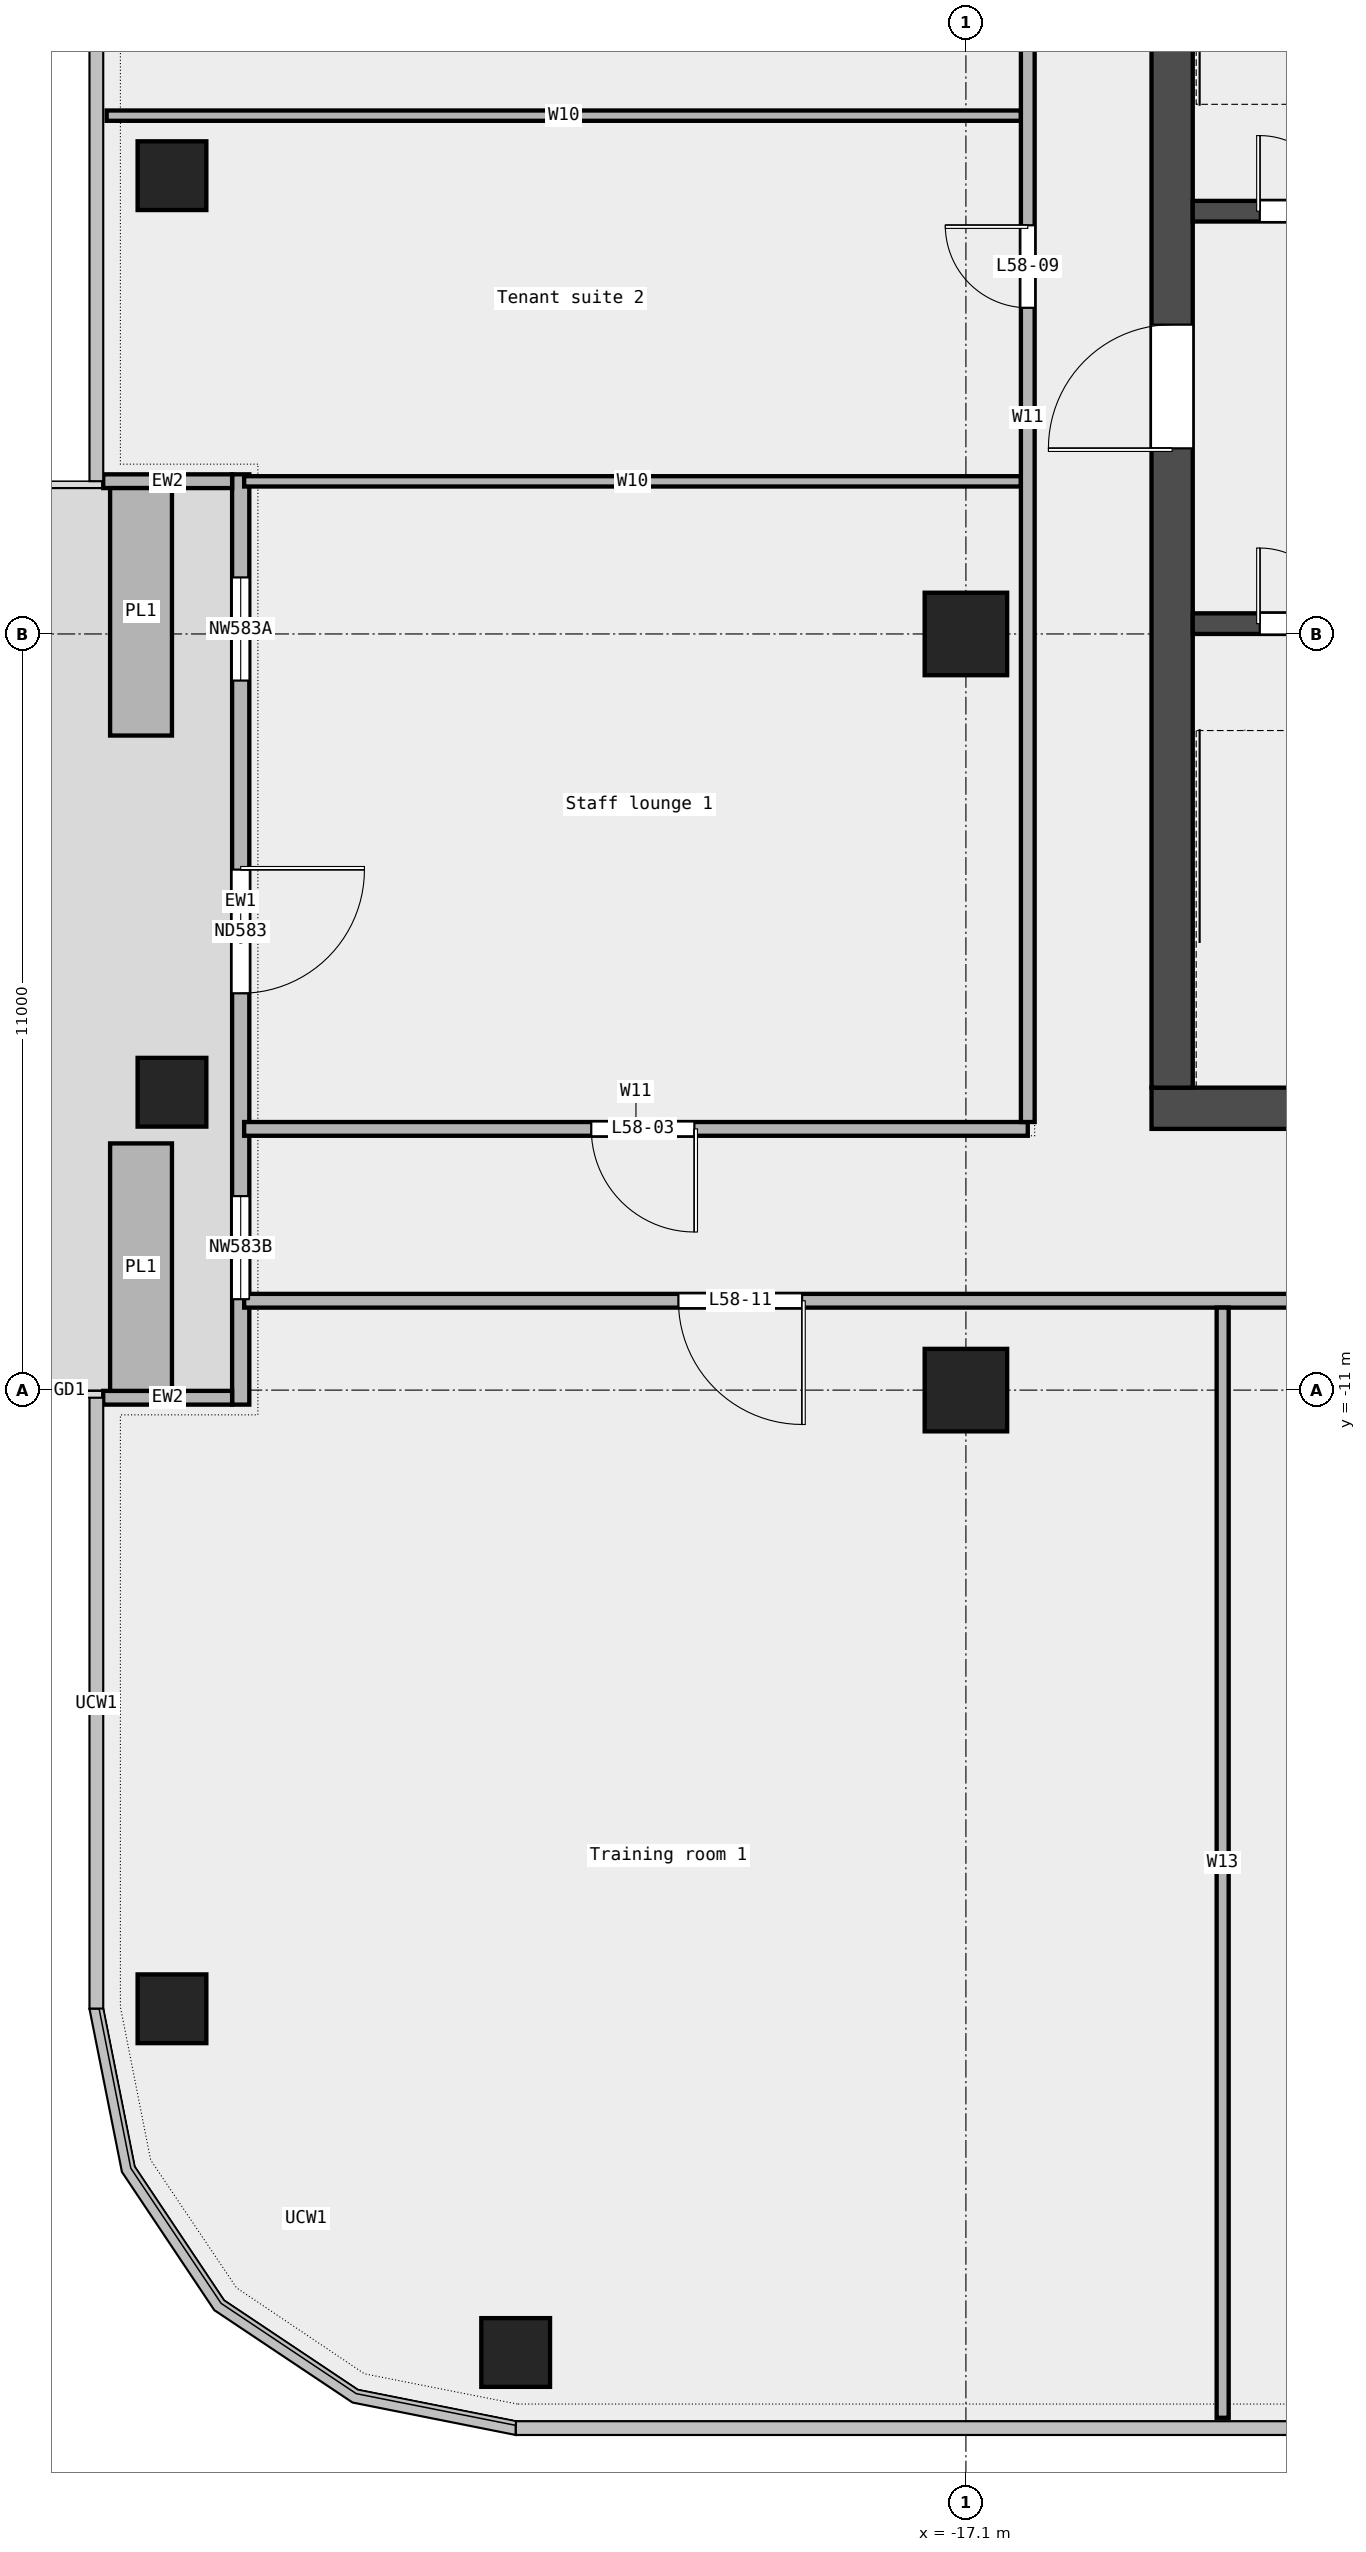
"""IFC4 building model, lengths in metres.
Left out: names, types, materials, properties, quantities, classifications, styles, units other than length and angle.
Written with IfcOpenShell. Run it as: python <this file> out.ifc"""

import sys

from ifc_helpers import new_model, si_unit, direction, frame, frame_2d, origin, origin_2d, place, context, subcontext, project, spatial, rectangle, extrude, element, fill, save


model = new_model("IFC4")
c1 = context("Model", 3, precision=1e-05, world=origin(), true_north=direction((0.0, 1.0)))
c2 = subcontext(c1, "Body", "Model", "MODEL_VIEW")
j1 = project(units=[si_unit("LENGTHUNIT", "METRE"), si_unit("PLANEANGLEUNIT", "RADIAN")], contexts=[c1])
p1 = place(None, origin())
s1 = spatial("IfcSite", under=j1, at=p1, CompositionType="ELEMENT")
p2 = place(p1, origin())
s2 = spatial("IfcBuilding", under=s1, at=p2, CompositionType="ELEMENT")
p3 = place(p2, frame((0.0, 0.0, 271.4)))
s3 = spatial("IfcBuildingStorey", under=s2, at=p3, CompositionType="ELEMENT", Elevation=271.4)
for number, where, z_axis, x_axis in (
    (1, (-23.65, -25.0, 0.0), (0.0, 0.0, 1.0), (1.0, 0.0, 0.0)),
    (2, (-28.65, 6.667, 0.0), (0.0, 0.0, 1.0), (1.0, 0.0, 0.0)),
    (3, (-28.65, -6.667, 0.0), (0.0, 0.0, 1.0), (1.0, 0.0, 0.0)),
    (4, (-28.65, -20.0, 0.0), (0.0, 0.0, 1.0), (1.0, 0.0, 0.0)),
):
    element("IfcColumn", number, at=place(p3, frame(where, z_axis=z_axis, x_axis=x_axis)), inside=s3, PredefinedType="COLUMN", context=c2, shape_type="SweptSolid", body=[
        extrude(rectangle(XDim=1.0, YDim=1.0, at=origin_2d()), origin(), (0.0, 0.0, 1.0), 3.6),
    ])
for number, where, z_axis, x_axis in (
    (5, (-17.1, -11.0, 0.0), (0.0, 0.0, 1.0), (1.0, 0.0, 0.0)),
    (6, (-17.1, 0.0, 0.0), (0.0, 0.0, 1.0), (1.0, 0.0, 0.0)),
):
    element("IfcColumn", number, at=place(p3, frame(where, z_axis=z_axis, x_axis=x_axis)), inside=s3, PredefinedType="COLUMN", context=c2, shape_type="SweptSolid", body=[
        extrude(rectangle(XDim=1.2, YDim=1.2, at=origin_2d()), origin(), (0.0, 0.0, 1.0), 3.6),
    ])
p4 = place(p3, frame((-27.65, 2.322, 0.0), z_axis=(0.0, 0.0, 1.0), x_axis=(0.0, -1.0, 0.0)))
e7 = element("IfcWall", 7, at=p4, inside=s3, PredefinedType="STANDARD", context=c2, shape_type="SweptSolid", body=[
    extrude(rectangle(XDim=13.533, YDim=0.25, at=frame_2d((6.767, 0.0))), origin(), (0.0, 0.0, 1.0), 3.6),
])
p5 = place(p4, frame((1.5, 0.0, 0.45)))
e8 = element("IfcOpeningElement", 8, at=p5, cuts=e7, PredefinedType="OPENING", context=c2, shape_type="SweptSolid", body=[
    extrude(rectangle(XDim=1.5, YDim=2.4, at=frame_2d((0.75, 1.2))), frame((0.0, 0.137, 0.0), z_axis=(0.0, -1.0, 0.0), x_axis=(1.0, 0.0, 0.0)), (0.0, 0.0, 1.0), 0.274),
])
p6 = place(p4, frame((5.75, 0.0, 0.0)))
e9 = element("IfcOpeningElement", 9, at=p6, cuts=e7, PredefinedType="OPENING", context=c2, shape_type="SweptSolid", body=[
    extrude(rectangle(XDim=1.8, YDim=2.4, at=frame_2d((0.9, 1.2))), frame((0.0, 0.137, 0.0), z_axis=(0.0, -1.0, 0.0), x_axis=(1.0, 0.0, 0.0)), (0.0, 0.0, 1.0), 0.274),
])
p7 = place(p4, frame((10.5, 0.0, 0.45)))
e10 = element("IfcOpeningElement", 10, at=p7, cuts=e7, PredefinedType="OPENING", context=c2, shape_type="SweptSolid", body=[
    extrude(rectangle(XDim=1.5, YDim=2.4, at=frame_2d((0.75, 1.2))), frame((0.0, 0.137, 0.0), z_axis=(0.0, -1.0, 0.0), x_axis=(1.0, 0.0, 0.0)), (0.0, 0.0, 1.0), 0.274),
])
for number, where, z_axis, x_axis in (
    (11, (-29.65, 2.222, 0.0), (0.0, 0.0, 1.0), (1.0, 0.0, 0.0)),
    (12, (-29.65, -11.111, 0.0), (0.0, 0.0, 1.0), (1.0, 0.0, 0.0)),
):
    element("IfcWall", number, at=place(p3, frame(where, z_axis=z_axis, x_axis=x_axis)), inside=s3, PredefinedType="STANDARD", context=c2, shape_type="SweptSolid", body=[
        extrude(rectangle(XDim=1.875, YDim=0.2, at=frame_2d((0.938, 0.0))), origin(), (0.0, 0.0, 1.0), 3.6),
    ])
for number, where, z_axis, x_axis in (
    (13, (-29.1, 2.122, 0.0), (0.0, 0.0, 1.0), (0.0, -1.0, 0.0)),
    (14, (-29.1, -7.411, 0.0), (0.0, 0.0, 1.0), (0.0, -1.0, 0.0)),
):
    element("IfcWall", number, at=place(p3, frame(where, z_axis=z_axis, x_axis=x_axis)), inside=s3, PredefinedType="STANDARD", context=c2, shape_type="SweptSolid", body=[
        extrude(rectangle(XDim=3.6, YDim=0.9, at=frame_2d((1.8, 0.0))), origin(), (0.0, 0.0, 1.0), 0.7),
    ])
p8 = place(p3, frame((-27.6, -9.7, 0.0), z_axis=(0.0, 0.0, 1.0), x_axis=(1.0, 0.0, 0.0)))
e15 = element("IfcWall", 15, at=p8, inside=s3, PredefinedType="PARTITIONING", context=c2, shape_type="SweptSolid", body=[
    extrude(rectangle(XDim=55.2, YDim=0.2, at=frame_2d((27.6, 0.0))), origin(), (0.0, 0.0, 1.0), 3.6),
])
p9 = place(p8, frame((47.083, 0.0, 0.0)))
e16 = element("IfcOpeningElement", 16, at=p9, cuts=e15, PredefinedType="OPENING", context=c2, shape_type="SweptSolid", body=[
    extrude(rectangle(XDim=1.8, YDim=2.1, at=frame_2d((0.9, 1.05))), frame((0.0, 0.112, 0.0), z_axis=(0.0, -1.0, 0.0), x_axis=(1.0, 0.0, 0.0)), (0.0, 0.0, 1.0), 0.224),
])
p10 = place(p8, frame((26.7, 0.0, 0.0)))
e17 = element("IfcOpeningElement", 17, at=p10, cuts=e15, PredefinedType="OPENING", context=c2, shape_type="SweptSolid", body=[
    extrude(rectangle(XDim=1.8, YDim=2.1, at=frame_2d((0.9, 1.05))), frame((0.0, 0.112, 0.0), z_axis=(0.0, -1.0, 0.0), x_axis=(1.0, 0.0, 0.0)), (0.0, 0.0, 1.0), 0.224),
])
p11 = place(p8, frame((6.317, 0.0, 0.0)))
e18 = element("IfcOpeningElement", 18, at=p11, cuts=e15, PredefinedType="OPENING", context=c2, shape_type="SweptSolid", body=[
    extrude(rectangle(XDim=1.8, YDim=2.1, at=frame_2d((0.9, 1.05))), frame((0.0, 0.112, 0.0), z_axis=(0.0, -1.0, 0.0), x_axis=(1.0, 0.0, 0.0)), (0.0, 0.0, 1.0), 0.224),
])
p12 = place(p3, frame((-27.6, -7.2, 0.0), z_axis=(0.0, 0.0, 1.0), x_axis=(1.0, 0.0, 0.0)))
e19 = element("IfcWall", 19, at=p12, inside=s3, PredefinedType="PARTITIONING", context=c2, shape_type="SweptSolid", body=[
    extrude(rectangle(XDim=11.4, YDim=0.2, at=frame_2d((5.7, 0.0))), origin(), (0.0, 0.0, 1.0), 3.6),
])
p13 = place(p12, frame((5.05, 0.0, 0.0)))
e20 = element("IfcOpeningElement", 20, at=p13, cuts=e19, PredefinedType="OPENING", context=c2, shape_type="SweptSolid", body=[
    extrude(rectangle(XDim=1.5, YDim=2.1, at=frame_2d((0.75, 1.05))), frame((0.0, 0.112, 0.0), z_axis=(0.0, -1.0, 0.0), x_axis=(1.0, 0.0, 0.0)), (0.0, 0.0, 1.0), 0.224),
])
p14 = place(p3, frame((-27.6, 2.22, 0.0), z_axis=(0.0, 0.0, 1.0), x_axis=(1.0, 0.0, 0.0)))
e21 = element("IfcWall", 21, at=p14, inside=s3, PredefinedType="PARTITIONING", context=c2, shape_type="SweptSolid", body=[
    extrude(rectangle(XDim=11.3, YDim=0.15, at=frame_2d((5.65, 0.0))), origin(), (0.0, 0.0, 1.0), 3.6),
])
p15 = place(p3, frame((-29.6, 7.54, 0.0), z_axis=(0.0, 0.0, 1.0), x_axis=(1.0, 0.0, 0.0)))
e22 = element("IfcWall", 22, at=p15, inside=s3, PredefinedType="PARTITIONING", context=c2, shape_type="SweptSolid", body=[
    extrude(rectangle(XDim=13.3, YDim=0.15, at=frame_2d((6.65, 0.0))), origin(), (0.0, 0.0, 1.0), 3.6),
])
p16 = place(p3, frame((-16.2, -7.1, 0.0), z_axis=(0.0, 0.0, 1.0), x_axis=(0.0, 1.0, 0.0)))
e23 = element("IfcWall", 23, at=p16, inside=s3, PredefinedType="PARTITIONING", context=c2, shape_type="SweptSolid", body=[
    extrude(rectangle(XDim=20.5, YDim=0.2, at=frame_2d((10.25, 0.0))), origin(), (0.0, 0.0, 1.0), 3.6),
])
p17 = place(p16, frame((11.845, 0.0, 0.0)))
e24 = element("IfcOpeningElement", 24, at=p17, cuts=e23, PredefinedType="OPENING", context=c2, shape_type="SweptSolid", body=[
    extrude(rectangle(XDim=1.2, YDim=2.1, at=frame_2d((0.6, 1.05))), frame((0.0, 0.112, 0.0), z_axis=(0.0, -1.0, 0.0), x_axis=(1.0, 0.0, 0.0)), (0.0, 0.0, 1.0), 0.224),
])
p18 = place(p3, frame((-13.365, -25.95, 0.0), z_axis=(0.0, 0.0, 1.0), x_axis=(0.0, 1.0, 0.0)))
e25 = element("IfcWall", 25, at=p18, inside=s3, PredefinedType="PARTITIONING", context=c2, shape_type="SweptSolid", body=[
    extrude(rectangle(XDim=16.15, YDim=0.175, at=frame_2d((8.075, 0.0))), origin(), (0.0, 0.0, 1.0), 3.6),
])
p19 = place(p3, frame((-14.4, -6.9, 0.0), z_axis=(0.0, 0.0, 1.0), x_axis=(1.0, 0.0, 0.0)))
e26 = element("IfcWall", 26, at=p19, inside=s3, PredefinedType="SHEAR", context=c2, shape_type="SweptSolid", body=[
    extrude(rectangle(XDim=28.8, YDim=0.6, at=frame_2d((14.4, 0.0))), origin(), (0.0, 0.0, 1.0), 3.7),
])
p20 = place(p19, frame((4.337, 0.0, 0.0)))
e27 = element("IfcOpeningElement", 27, at=p20, cuts=e26, PredefinedType="OPENING", context=c2, shape_type="SweptSolid", body=[
    extrude(rectangle(XDim=1.0, YDim=2.1, at=frame_2d((0.5, 1.05))), frame((0.0, 0.312, 0.0), z_axis=(0.0, -1.0, 0.0), x_axis=(1.0, 0.0, 0.0)), (0.0, 0.0, 1.0), 0.624),
])
p21 = place(p19, frame((8.55, 0.0, 0.0)))
e28 = element("IfcOpeningElement", 28, at=p21, cuts=e26, PredefinedType="OPENING", context=c2, shape_type="SweptSolid", body=[
    extrude(rectangle(XDim=1.2, YDim=2.1, at=frame_2d((0.6, 1.05))), frame((0.0, 0.312, 0.0), z_axis=(0.0, -1.0, 0.0), x_axis=(1.0, 0.0, 0.0)), (0.0, 0.0, 1.0), 0.624),
])
p22 = place(p19, frame((12.962, 0.0, 0.0)))
e29 = element("IfcOpeningElement", 29, at=p22, cuts=e26, PredefinedType="OPENING", context=c2, shape_type="SweptSolid", body=[
    extrude(rectangle(XDim=1.0, YDim=2.1, at=frame_2d((0.5, 1.05))), frame((0.0, 0.312, 0.0), z_axis=(0.0, -1.0, 0.0), x_axis=(1.0, 0.0, 0.0)), (0.0, 0.0, 1.0), 0.624),
])
p23 = place(p19, frame((15.212, 0.0, 0.0)))
e30 = element("IfcOpeningElement", 30, at=p23, cuts=e26, PredefinedType="OPENING", context=c2, shape_type="SweptSolid", body=[
    extrude(rectangle(XDim=1.0, YDim=2.1, at=frame_2d((0.5, 1.05))), frame((0.0, 0.312, 0.0), z_axis=(0.0, -1.0, 0.0), x_axis=(1.0, 0.0, 0.0)), (0.0, 0.0, 1.0), 0.624),
])
p24 = place(p19, frame((18.75, 0.0, 0.0)))
e31 = element("IfcOpeningElement", 31, at=p24, cuts=e26, PredefinedType="OPENING", context=c2, shape_type="SweptSolid", body=[
    extrude(rectangle(XDim=1.8, YDim=2.1, at=frame_2d((0.9, 1.05))), frame((0.0, 0.312, 0.0), z_axis=(0.0, -1.0, 0.0), x_axis=(1.0, 0.0, 0.0)), (0.0, 0.0, 1.0), 0.624),
])
p25 = place(p19, frame((23.087, 0.0, 0.0)))
e32 = element("IfcOpeningElement", 32, at=p25, cuts=e26, PredefinedType="OPENING", context=c2, shape_type="SweptSolid", body=[
    extrude(rectangle(XDim=1.0, YDim=2.1, at=frame_2d((0.5, 1.05))), frame((0.0, 0.312, 0.0), z_axis=(0.0, -1.0, 0.0), x_axis=(1.0, 0.0, 0.0)), (0.0, 0.0, 1.0), 0.624),
])
p26 = place(p3, frame((-14.1, -6.6, 0.0), z_axis=(0.0, 0.0, 1.0), x_axis=(0.0, 1.0, 0.0)))
e33 = element("IfcWall", 33, at=p26, inside=s3, PredefinedType="SHEAR", context=c2, shape_type="SweptSolid", body=[
    extrude(rectangle(XDim=19.5, YDim=0.6, at=frame_2d((9.75, 0.0))), origin(), (0.0, 0.0, 1.0), 3.7),
])
p27 = place(p26, frame((9.3, 0.0, 0.0)))
e34 = element("IfcOpeningElement", 34, at=p27, cuts=e33, PredefinedType="OPENING", context=c2, shape_type="SweptSolid", body=[
    extrude(rectangle(XDim=1.8, YDim=2.1, at=frame_2d((0.9, 1.05))), frame((0.0, 0.312, 0.0), z_axis=(0.0, -1.0, 0.0), x_axis=(1.0, 0.0, 0.0)), (0.0, 0.0, 1.0), 0.624),
])
p28 = place(p3, frame((-13.8, 0.15, 0.0), z_axis=(0.0, 0.0, 1.0), x_axis=(1.0, 0.0, 0.0)))
e35 = element("IfcWall", 35, at=p28, inside=s3, PredefinedType="SOLIDWALL", context=c2, shape_type="SweptSolid", body=[
    extrude(rectangle(XDim=3.15, YDim=0.3, at=frame_2d((1.575, 0.0))), origin(), (0.0, 0.0, 1.0), 3.7),
])
p29 = place(p28, frame((0.975, 0.0, 0.0)))
e36 = element("IfcOpeningElement", 36, at=p29, cuts=e35, PredefinedType="OPENING", context=c2, shape_type="SweptSolid", body=[
    extrude(rectangle(XDim=1.1, YDim=2.1, at=frame_2d((0.55, 1.05))), frame((0.0, 0.162, 0.0), z_axis=(0.0, -1.0, 0.0), x_axis=(1.0, 0.0, 0.0)), (0.0, 0.0, 1.0), 0.324),
])
p30 = place(p3, frame((-13.8, 6.15, 0.0), z_axis=(0.0, 0.0, 1.0), x_axis=(1.0, 0.0, 0.0)))
e37 = element("IfcWall", 37, at=p30, inside=s3, PredefinedType="SOLIDWALL", context=c2, shape_type="SweptSolid", body=[
    extrude(rectangle(XDim=3.15, YDim=0.3, at=frame_2d((1.575, 0.0))), origin(), (0.0, 0.0, 1.0), 3.7),
])
p31 = place(p30, frame((0.975, 0.0, 0.0)))
e38 = element("IfcOpeningElement", 38, at=p31, cuts=e37, PredefinedType="OPENING", context=c2, shape_type="SweptSolid", body=[
    extrude(rectangle(XDim=1.1, YDim=2.1, at=frame_2d((0.55, 1.05))), frame((0.0, 0.162, 0.0), z_axis=(0.0, -1.0, 0.0), x_axis=(1.0, 0.0, 0.0)), (0.0, 0.0, 1.0), 0.324),
])
p32 = place(p5, origin())
e39 = element("IfcWindow", 39, at=p32, inside=s3, PartitioningType="SINGLE_PANEL", PredefinedType="WINDOW", context=c2, shape_type="SweptSolid", body=[
    extrude(rectangle(XDim=1.5, YDim=2.4, at=frame_2d((0.75, 1.2))), frame((0.0, 0.03, 0.0), z_axis=(0.0, -1.0, 0.0), x_axis=(1.0, 0.0, 0.0)), (0.0, 0.0, 1.0), 0.06),
])
fill(e8, e39)
p33 = place(p6, origin())
e40 = element("IfcDoor", 40, at=p33, inside=s3, OperationType="DOUBLE_DOOR_SINGLE_SWING", PredefinedType="DOOR", context=c2, shape_type="SweptSolid", body=[
    extrude(rectangle(XDim=1.8, YDim=2.4, at=frame_2d((0.9, 1.2))), frame((0.0, 0.025, 0.0), z_axis=(0.0, -1.0, 0.0), x_axis=(1.0, 0.0, 0.0)), (0.0, 0.0, 1.0), 0.05),
])
fill(e9, e40)
p34 = place(p7, origin())
e41 = element("IfcWindow", 41, at=p34, inside=s3, PartitioningType="SINGLE_PANEL", PredefinedType="WINDOW", context=c2, shape_type="SweptSolid", body=[
    extrude(rectangle(XDim=1.5, YDim=2.4, at=frame_2d((0.75, 1.2))), frame((0.0, 0.03, 0.0), z_axis=(0.0, -1.0, 0.0), x_axis=(1.0, 0.0, 0.0)), (0.0, 0.0, 1.0), 0.06),
])
fill(e10, e41)
p35 = place(p13, origin())
e42 = element("IfcDoor", 42, at=p35, inside=s3, OperationType="DOUBLE_DOOR_SINGLE_SWING", PredefinedType="DOOR", context=c2, shape_type="SweptSolid", body=[
    extrude(rectangle(XDim=1.5, YDim=2.1, at=frame_2d((0.75, 1.05))), frame((0.0, 0.025, 0.0), z_axis=(0.0, -1.0, 0.0), x_axis=(1.0, 0.0, 0.0)), (0.0, 0.0, 1.0), 0.05),
])
fill(e20, e42)
p36 = place(p17, origin())
e43 = element("IfcDoor", 43, at=p36, inside=s3, OperationType="SINGLE_SWING_RIGHT", PredefinedType="DOOR", context=c2, shape_type="SweptSolid", body=[
    extrude(rectangle(XDim=1.2, YDim=2.1, at=frame_2d((0.6, 1.05))), frame((0.0, 0.025, 0.0), z_axis=(0.0, -1.0, 0.0), x_axis=(1.0, 0.0, 0.0)), (0.0, 0.0, 1.0), 0.05),
])
fill(e24, e43)
p37 = place(p11, origin())
e44 = element("IfcDoor", 44, at=p37, inside=s3, OperationType="DOUBLE_DOOR_SINGLE_SWING", PredefinedType="DOOR", context=c2, shape_type="SweptSolid", body=[
    extrude(rectangle(XDim=1.8, YDim=2.1, at=frame_2d((0.9, 1.05))), frame((0.0, 0.025, 0.0), z_axis=(0.0, -1.0, 0.0), x_axis=(1.0, 0.0, 0.0)), (0.0, 0.0, 1.0), 0.05),
])
fill(e18, e44)
p38 = place(p29, origin())
e45 = element("IfcDoor", 45, at=p38, inside=s3, OperationType="SINGLE_SWING_LEFT", PredefinedType="DOOR", context=c2, shape_type="SweptSolid", body=[
    extrude(rectangle(XDim=1.1, YDim=2.1, at=frame_2d((0.55, 1.05))), frame((0.0, 0.025, 0.0), z_axis=(0.0, -1.0, 0.0), x_axis=(1.0, 0.0, 0.0)), (0.0, 0.0, 1.0), 0.05),
])
fill(e36, e45)
p39 = place(p31, origin())
e46 = element("IfcDoor", 46, at=p39, inside=s3, OperationType="SINGLE_SWING_LEFT", PredefinedType="DOOR", context=c2, shape_type="SweptSolid", body=[
    extrude(rectangle(XDim=1.1, YDim=2.1, at=frame_2d((0.55, 1.05))), frame((0.0, 0.025, 0.0), z_axis=(0.0, -1.0, 0.0), x_axis=(1.0, 0.0, 0.0)), (0.0, 0.0, 1.0), 0.05),
])
fill(e38, e46)
p40 = place(p27, origin())
e47 = element("IfcDoor", 47, at=p40, inside=s3, OperationType="DOUBLE_DOOR_SINGLE_SWING", PredefinedType="DOOR", context=c2, shape_type="SweptSolid", body=[
    extrude(rectangle(XDim=1.8, YDim=2.1, at=frame_2d((0.9, 1.05))), frame((0.0, 0.025, 0.0), z_axis=(0.0, -1.0, 0.0), x_axis=(1.0, 0.0, 0.0)), (0.0, 0.0, 1.0), 0.05),
])
fill(e34, e47)
save(model, sys.argv[1])
